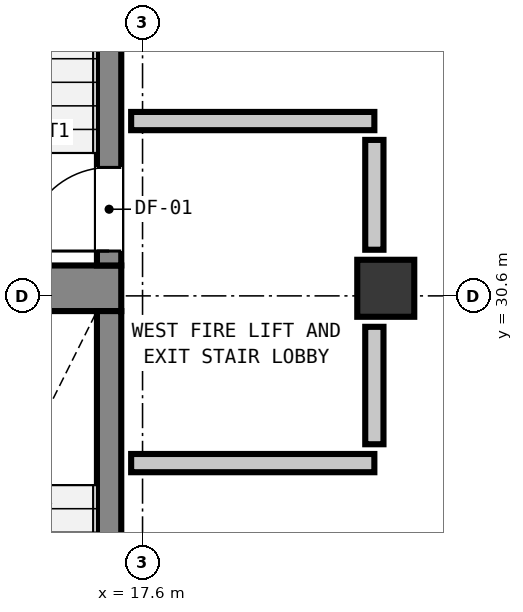
"""IFC4 building model, lengths in metres.
Left out: names, types, materials, properties, quantities, classifications, styles, units other than length and angle.
Written with IfcOpenShell. Run it as: python <this file> out.ifc"""

import sys

from ifc_helpers import new_model, si_unit, direction, frame, frame_2d, origin, origin_2d, place, context, subcontext, project, spatial, rectangle, extrude, element, fill, save


model = new_model("IFC4")
c1 = context("Model", 3, precision=1e-05, world=origin(), true_north=direction((0.0, 1.0)))
c2 = subcontext(c1, "Body", "Model", "MODEL_VIEW")
j1 = project(units=[si_unit("LENGTHUNIT", "METRE"), si_unit("PLANEANGLEUNIT", "RADIAN")], contexts=[c1])
p1 = place(None, origin())
s1 = spatial("IfcSite", under=j1, at=p1, CompositionType="ELEMENT")
p2 = place(p1, origin())
s2 = spatial("IfcBuilding", under=s1, at=p2, CompositionType="ELEMENT")
p3 = place(p2, frame((0.0, 0.0, 292.78)))
s3 = spatial("IfcBuildingStorey", under=s2, at=p3, CompositionType="ELEMENT", Elevation=292.78)
p4 = place(p3, frame((13.24, 30.7, 0.0), z_axis=(0.0, 0.0, 1.0), x_axis=(1.0, 0.0, 0.0)))
e1 = element("IfcWall", 1, at=p4, inside=s3, PredefinedType="SHEAR", context=c2, shape_type="SweptSolid", body=[
    extrude(rectangle(XDim=4.08, YDim=0.6, at=frame_2d((2.04, 0.0))), origin(), (0.0, 0.0, 1.0), 4.9),
])
p5 = place(p3, frame((17.16, 31.0, 0.0), z_axis=(0.0, 0.0, 1.0), x_axis=(0.0, 1.0, 0.0)))
e2 = element("IfcWall", 2, at=p5, inside=s3, PredefinedType="SHEAR", context=c2, shape_type="SweptSolid", body=[
    extrude(rectangle(XDim=7.8, YDim=0.32, at=frame_2d((3.9, 0.0))), origin(), (0.0, 0.0, 1.0), 4.9),
])
p6 = place(p5, frame((0.19, 0.0, 0.0)))
e3 = element("IfcOpeningElement", 3, at=p6, cuts=e2, PredefinedType="OPENING", context=c2, shape_type="SweptSolid", body=[
    extrude(rectangle(XDim=1.1, YDim=2.15, at=frame_2d((0.55, 1.075))), frame((0.0, 0.17, 0.0), z_axis=(0.0, -1.0, 0.0), x_axis=(1.0, 0.0, 0.0)), (0.0, 0.0, 1.0), 0.34),
])
p7 = place(p3, frame((17.16, 22.3, 0.0), z_axis=(0.0, 0.0, 1.0), x_axis=(0.0, 1.0, 0.0)))
e4 = element("IfcWall", 4, at=p7, inside=s3, PredefinedType="SHEAR", context=c2, shape_type="SweptSolid", body=[
    extrude(rectangle(XDim=8.1, YDim=0.32, at=frame_2d((4.05, 0.0))), origin(), (0.0, 0.0, 1.0), 4.9),
])
p8 = place(p7, frame((0.49, 0.0, 0.0)))
e5 = element("IfcOpeningElement", 5, at=p8, cuts=e4, PredefinedType="OPENING", context=c2, shape_type="SweptSolid", body=[
    extrude(rectangle(XDim=1.1, YDim=2.15, at=frame_2d((0.55, 1.075))), frame((0.0, 0.17, 0.0), z_axis=(0.0, -1.0, 0.0), x_axis=(1.0, 0.0, 0.0)), (0.0, 0.0, 1.0), 0.34),
])
p9 = place(p3, frame((20.8, 30.7, 0.0), z_axis=(0.0, 0.0, 1.0), x_axis=(1.0, 0.0, 0.0)))
e6 = element("IfcColumn", 6, at=p9, inside=s3, PredefinedType="COLUMN", context=c2, shape_type="SweptSolid", body=[
    extrude(rectangle(XDim=0.75, YDim=0.75, at=origin_2d()), origin(), (0.0, 0.0, 1.0), 4.9),
])
for number, where, z_axis, x_axis in (
    (7, (17.45, 28.4, 0.0), (0.0, 0.0, 1.0), (1.0, 0.0, 0.0)),
    (8, (17.45, 32.9, 0.0), (0.0, 0.0, 1.0), (1.0, 0.0, 0.0)),
):
    element("IfcWall", number, at=place(p3, frame(where, z_axis=z_axis, x_axis=x_axis)), inside=s3, PredefinedType="PARTITIONING", context=c2, shape_type="SweptSolid", body=[
        extrude(rectangle(XDim=3.2, YDim=0.24, at=frame_2d((1.6, 0.0))), origin(), (0.0, 0.0, 1.0), 4.62),
    ])
p10 = place(p3, frame((20.65, 28.648, 0.0), z_axis=(0.0, 0.0, 1.0), x_axis=(0.0, 1.0, 0.0)))
e9 = element("IfcWall", 9, at=p10, inside=s3, PredefinedType="PARTITIONING", context=c2, shape_type="SweptSolid", body=[
    extrude(rectangle(XDim=1.545, YDim=0.24, at=frame_2d((0.772, 0.0))), origin(), (0.0, 0.0, 1.0), 3.912),
])
p11 = place(p3, frame((20.65, 31.207, 0.0), z_axis=(0.0, 0.0, 1.0), x_axis=(0.0, 1.0, 0.0)))
e10 = element("IfcWall", 10, at=p11, inside=s3, PredefinedType="PARTITIONING", context=c2, shape_type="SweptSolid", body=[
    extrude(rectangle(XDim=1.445, YDim=0.24, at=frame_2d((0.723, 0.0))), origin(), (0.0, 0.0, 1.0), 3.912),
])
p12 = place(p6, origin())
e11 = element("IfcDoor", 11, at=p12, inside=s3, OperationType="SINGLE_SWING_LEFT", PredefinedType="DOOR", context=c2, shape_type="SweptSolid", body=[
    extrude(rectangle(XDim=1.1, YDim=2.15, at=frame_2d((0.55, 1.075))), frame((0.0, 0.025, 0.0), z_axis=(0.0, -1.0, 0.0), x_axis=(1.0, 0.0, 0.0)), (0.0, 0.0, 1.0), 0.05),
])
fill(e3, e11)
save(model, sys.argv[1])
